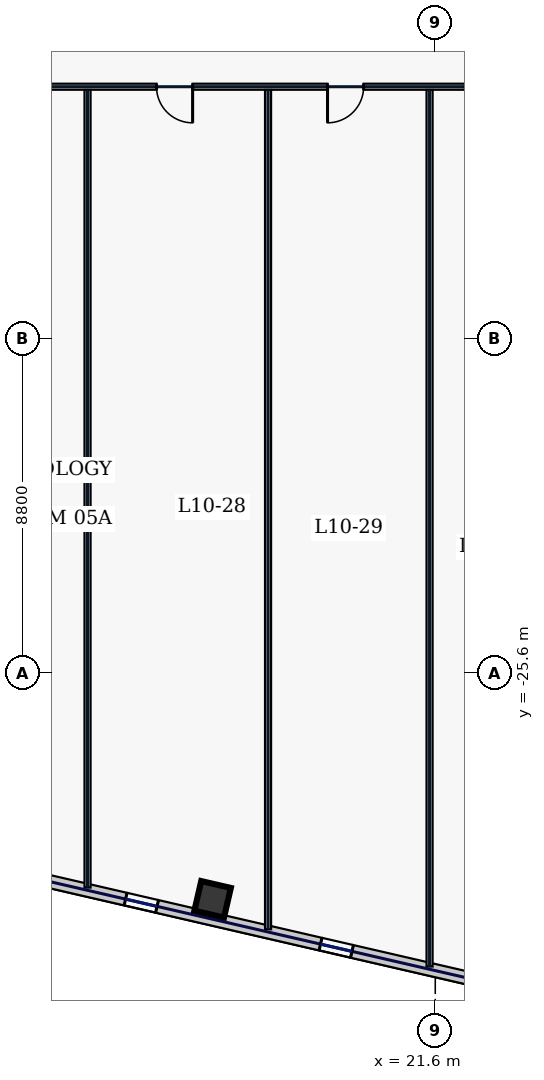
"""IFC4 building model, lengths in metres.
Left out: names, types, materials, properties, quantities, classifications, styles, units other than length and angle.
Written with IfcOpenShell. Run it as: python <this file> out.ifc"""

import sys

from ifc_helpers import new_model, si_unit, direction, frame, frame_2d, origin, origin_2d, place, context, subcontext, project, spatial, rectangle, hollow_rectangle, extrude, element, fill, save


model = new_model("IFC4")
c1 = context("Model", 3, precision=1e-05, world=origin(), true_north=direction((0.0, 1.0)))
c2 = subcontext(c1, "Body", "Model", "MODEL_VIEW")
j1 = project(units=[si_unit("LENGTHUNIT", "METRE"), si_unit("PLANEANGLEUNIT", "RADIAN")], contexts=[c1])
p1 = place(None, origin())
s1 = spatial("IfcSite", under=j1, at=p1, CompositionType="ELEMENT")
p2 = place(p1, origin())
s2 = spatial("IfcBuilding", under=s1, at=p2, CompositionType="ELEMENT")
p3 = place(p2, frame((0.0, 0.0, 51.4)))
s3 = spatial("IfcBuildingStorey", under=s2, at=p3, CompositionType="ELEMENT", Elevation=51.4)
p4 = place(p3, frame((15.741, -31.564, 0.0), z_axis=(0.0, 0.0, 1.0), x_axis=(0.974370064785, -0.224951054344, 0.0)))
e1 = element("IfcColumn", 1, at=p4, inside=s3, PredefinedType="COLUMN", context=c2, shape_type="SweptSolid", body=[
    extrude(hollow_rectangle(XDim=0.8, YDim=0.8, WallThickness=0.036, at=origin_2d()), origin(), (0.0, 0.0, 1.0), 3.74),
])
p5 = place(p3, frame((3.717, -29.311, 0.0), z_axis=(0.0, 0.0, 1.0), x_axis=(0.97436993772, -0.224951604723, 0.0)))
e2 = element("IfcWall", 2, at=p5, inside=s3, PredefinedType="STANDARD", context=c2, shape_type="SweptSolid", body=[
    extrude(rectangle(XDim=22.651, YDim=0.34, at=frame_2d((11.326, 0.0))), origin(), (0.0, 0.0, 1.0), 3.74),
])
p6 = place(p5, frame((3.856, 0.0, 0.72)))
e3 = element("IfcOpeningElement", 3, at=p6, cuts=e2, PredefinedType="OPENING", context=c2, shape_type="SweptSolid", body=[
    extrude(rectangle(XDim=2.5, YDim=2.15, at=frame_2d((1.25, 1.075))), frame((0.0, 0.18, 0.0), z_axis=(0.0, -1.0, 0.0), x_axis=(1.0, 0.0, 0.0)), (0.0, 0.0, 1.0), 0.36),
])
p7 = place(p5, frame((9.991, 0.0, 0.72)))
e4 = element("IfcOpeningElement", 4, at=p7, cuts=e2, PredefinedType="OPENING", context=c2, shape_type="SweptSolid", body=[
    extrude(rectangle(XDim=0.85, YDim=1.85, at=frame_2d((0.425, 0.925))), frame((0.0, 0.18, 0.0), z_axis=(0.0, -1.0, 0.0), x_axis=(1.0, 0.0, 0.0)), (0.0, 0.0, 1.0), 0.36),
])
p8 = place(p5, frame((15.255, 0.0, 0.72)))
e5 = element("IfcOpeningElement", 5, at=p8, cuts=e2, PredefinedType="OPENING", context=c2, shape_type="SweptSolid", body=[
    extrude(rectangle(XDim=0.85, YDim=1.85, at=frame_2d((0.425, 0.925))), frame((0.0, 0.18, 0.0), z_axis=(0.0, -1.0, 0.0), x_axis=(1.0, 0.0, 0.0)), (0.0, 0.0, 1.0), 0.36),
])
p9 = place(p5, frame((19.739, 0.0, 0.72)))
e6 = element("IfcOpeningElement", 6, at=p9, cuts=e2, PredefinedType="OPENING", context=c2, shape_type="SweptSolid", body=[
    extrude(rectangle(XDim=0.85, YDim=1.85, at=frame_2d((0.425, 0.925))), frame((0.0, 0.18, 0.0), z_axis=(0.0, -1.0, 0.0), x_axis=(1.0, 0.0, 0.0)), (0.0, 0.0, 1.0), 0.36),
])
p10 = place(p3, frame((29.415, -10.18, 0.0), z_axis=(0.0, 0.0, 1.0), x_axis=(-1.0, 0.0, 0.0)))
e7 = element("IfcWall", 7, at=p10, inside=s3, PredefinedType="PARTITIONING", context=c2, shape_type="SweptSolid", body=[
    extrude(rectangle(XDim=58.83, YDim=0.16, at=frame_2d((29.415, 0.0))), origin(), (0.0, 0.0, 1.0), 3.74),
])
p11 = place(p10, frame((56.006, 0.0, 0.0)))
e8 = element("IfcOpeningElement", 8, at=p11, cuts=e7, PredefinedType="OPENING", context=c2, shape_type="SweptSolid", body=[
    extrude(rectangle(XDim=1.05, YDim=2.2, at=frame_2d((0.525, 1.1))), frame((0.0, 0.09, 0.0), z_axis=(0.0, -1.0, 0.0), x_axis=(1.0, 0.0, 0.0)), (0.0, 0.0, 1.0), 0.18),
])
p12 = place(p10, frame((50.719, 0.0, 0.0)))
e9 = element("IfcOpeningElement", 9, at=p12, cuts=e7, PredefinedType="OPENING", context=c2, shape_type="SweptSolid", body=[
    extrude(rectangle(XDim=1.3, YDim=2.2, at=frame_2d((0.65, 1.1))), frame((0.0, 0.09, 0.0), z_axis=(0.0, -1.0, 0.0), x_axis=(1.0, 0.0, 0.0)), (0.0, 0.0, 1.0), 0.18),
])
p13 = place(p10, frame((45.208, 0.0, 0.0)))
e10 = element("IfcOpeningElement", 10, at=p13, cuts=e7, PredefinedType="OPENING", context=c2, shape_type="SweptSolid", body=[
    extrude(rectangle(XDim=1.3, YDim=2.2, at=frame_2d((0.65, 1.1))), frame((0.0, 0.09, 0.0), z_axis=(0.0, -1.0, 0.0), x_axis=(1.0, 0.0, 0.0)), (0.0, 0.0, 1.0), 0.18),
])
p14 = place(p10, frame((38.239, 0.0, 0.0)))
e11 = element("IfcOpeningElement", 11, at=p14, cuts=e7, PredefinedType="OPENING", context=c2, shape_type="SweptSolid", body=[
    extrude(rectangle(XDim=0.95, YDim=2.2, at=frame_2d((0.475, 1.1))), frame((0.0, 0.09, 0.0), z_axis=(0.0, -1.0, 0.0), x_axis=(1.0, 0.0, 0.0)), (0.0, 0.0, 1.0), 0.18),
])
p15 = place(p10, frame((30.55, 0.0, 0.0)))
e12 = element("IfcOpeningElement", 12, at=p15, cuts=e7, PredefinedType="OPENING", context=c2, shape_type="SweptSolid", body=[
    extrude(rectangle(XDim=0.95, YDim=2.2, at=frame_2d((0.475, 1.1))), frame((0.0, 0.09, 0.0), z_axis=(0.0, -1.0, 0.0), x_axis=(1.0, 0.0, 0.0)), (0.0, 0.0, 1.0), 0.18),
])
p16 = place(p10, frame((24.85, 0.0, 0.0)))
e13 = element("IfcOpeningElement", 13, at=p16, cuts=e7, PredefinedType="OPENING", context=c2, shape_type="SweptSolid", body=[
    extrude(rectangle(XDim=1.05, YDim=2.2, at=frame_2d((0.525, 1.1))), frame((0.0, 0.09, 0.0), z_axis=(0.0, -1.0, 0.0), x_axis=(1.0, 0.0, 0.0)), (0.0, 0.0, 1.0), 0.18),
])
p17 = place(p10, frame((19.4, 0.0, 0.0)))
e14 = element("IfcOpeningElement", 14, at=p17, cuts=e7, PredefinedType="OPENING", context=c2, shape_type="SweptSolid", body=[
    extrude(rectangle(XDim=0.95, YDim=2.2, at=frame_2d((0.475, 1.1))), frame((0.0, 0.09, 0.0), z_axis=(0.0, -1.0, 0.0), x_axis=(1.0, 0.0, 0.0)), (0.0, 0.0, 1.0), 0.18),
])
p18 = place(p10, frame((14.2, 0.0, 0.0)))
e15 = element("IfcOpeningElement", 15, at=p18, cuts=e7, PredefinedType="OPENING", context=c2, shape_type="SweptSolid", body=[
    extrude(rectangle(XDim=0.95, YDim=2.2, at=frame_2d((0.475, 1.1))), frame((0.0, 0.09, 0.0), z_axis=(0.0, -1.0, 0.0), x_axis=(1.0, 0.0, 0.0)), (0.0, 0.0, 1.0), 0.18),
])
p19 = place(p10, frame((9.7, 0.0, 0.0)))
e16 = element("IfcOpeningElement", 16, at=p19, cuts=e7, PredefinedType="OPENING", context=c2, shape_type="SweptSolid", body=[
    extrude(rectangle(XDim=0.95, YDim=2.2, at=frame_2d((0.475, 1.1))), frame((0.0, 0.09, 0.0), z_axis=(0.0, -1.0, 0.0), x_axis=(1.0, 0.0, 0.0)), (0.0, 0.0, 1.0), 0.18),
])
p20 = place(p10, frame((5.725, 0.0, 0.0)))
e17 = element("IfcOpeningElement", 17, at=p20, cuts=e7, PredefinedType="OPENING", context=c2, shape_type="SweptSolid", body=[
    extrude(rectangle(XDim=1.3, YDim=2.2, at=frame_2d((0.65, 1.1))), frame((0.0, 0.09, 0.0), z_axis=(0.0, -1.0, 0.0), x_axis=(1.0, 0.0, 0.0)), (0.0, 0.0, 1.0), 0.18),
])
p21 = place(p10, frame((1.894, 0.0, 0.0)))
e18 = element("IfcOpeningElement", 18, at=p21, cuts=e7, PredefinedType="OPENING", context=c2, shape_type="SweptSolid", body=[
    extrude(rectangle(XDim=1.3, YDim=2.2, at=frame_2d((0.65, 1.1))), frame((0.0, 0.09, 0.0), z_axis=(0.0, -1.0, 0.0), x_axis=(1.0, 0.0, 0.0)), (0.0, 0.0, 1.0), 0.18),
])
p22 = place(p3, frame((17.2, -32.352, 0.0), z_axis=(0.0, 0.0, 1.0), x_axis=(0.0, 1.0, 0.0)))
e19 = element("IfcWall", 19, at=p22, inside=s3, PredefinedType="PARTITIONING", context=c2, shape_type="SweptSolid", body=[
    extrude(rectangle(XDim=22.087, YDim=0.16, at=frame_2d((11.043, 0.0))), origin(), (0.0, 0.0, 1.0), 3.74),
])
p23 = place(p3, frame((12.45, -31.256, 0.0), z_axis=(0.0, 0.0, 1.0), x_axis=(0.0, 1.0, 0.0)))
e20 = element("IfcWall", 20, at=p23, inside=s3, PredefinedType="PARTITIONING", context=c2, shape_type="SweptSolid", body=[
    extrude(rectangle(XDim=20.991, YDim=0.16, at=frame_2d((10.495, 0.0))), origin(), (0.0, 0.0, 1.0), 3.74),
])
p24 = place(p3, frame((21.45, -33.333, 0.0), z_axis=(0.0, 0.0, 1.0), x_axis=(0.0, 1.0, 0.0)))
e21 = element("IfcWall", 21, at=p24, inside=s3, PredefinedType="PARTITIONING", context=c2, shape_type="SweptSolid", body=[
    extrude(rectangle(XDim=23.068, YDim=0.16, at=frame_2d((11.534, 0.0))), origin(), (0.0, 0.0, 1.0), 3.74),
])
p25 = place(p7, origin())
e22 = element("IfcWindow", 22, at=p25, inside=s3, PartitioningType="SINGLE_PANEL", PredefinedType="WINDOW", context=c2, shape_type="SweptSolid", body=[
    extrude(rectangle(XDim=0.85, YDim=1.85, at=frame_2d((0.425, 0.925))), frame((0.0, 0.03, 0.0), z_axis=(0.0, -1.0, 0.0), x_axis=(1.0, 0.0, 0.0)), (0.0, 0.0, 1.0), 0.06),
])
fill(e4, e22)
p26 = place(p8, origin())
e23 = element("IfcWindow", 23, at=p26, inside=s3, PartitioningType="SINGLE_PANEL", PredefinedType="WINDOW", context=c2, shape_type="SweptSolid", body=[
    extrude(rectangle(XDim=0.85, YDim=1.85, at=frame_2d((0.425, 0.925))), frame((0.0, 0.03, 0.0), z_axis=(0.0, -1.0, 0.0), x_axis=(1.0, 0.0, 0.0)), (0.0, 0.0, 1.0), 0.06),
])
fill(e5, e23)
p27 = place(p18, origin())
e24 = element("IfcDoor", 24, at=p27, inside=s3, OperationType="SINGLE_SWING_LEFT", PredefinedType="DOOR", context=c2, shape_type="SweptSolid", body=[
    extrude(rectangle(XDim=0.95, YDim=2.2, at=frame_2d((0.475, 1.1))), frame((0.0, 0.025, 0.0), z_axis=(0.0, -1.0, 0.0), x_axis=(1.0, 0.0, 0.0)), (0.0, 0.0, 1.0), 0.05),
])
fill(e15, e24)
p28 = place(p19, origin())
e25 = element("IfcDoor", 25, at=p28, inside=s3, OperationType="SINGLE_SWING_RIGHT", PredefinedType="DOOR", context=c2, shape_type="SweptSolid", body=[
    extrude(rectangle(XDim=0.95, YDim=2.2, at=frame_2d((0.475, 1.1))), frame((0.0, 0.025, 0.0), z_axis=(0.0, -1.0, 0.0), x_axis=(1.0, 0.0, 0.0)), (0.0, 0.0, 1.0), 0.05),
])
fill(e16, e25)
save(model, sys.argv[1])
